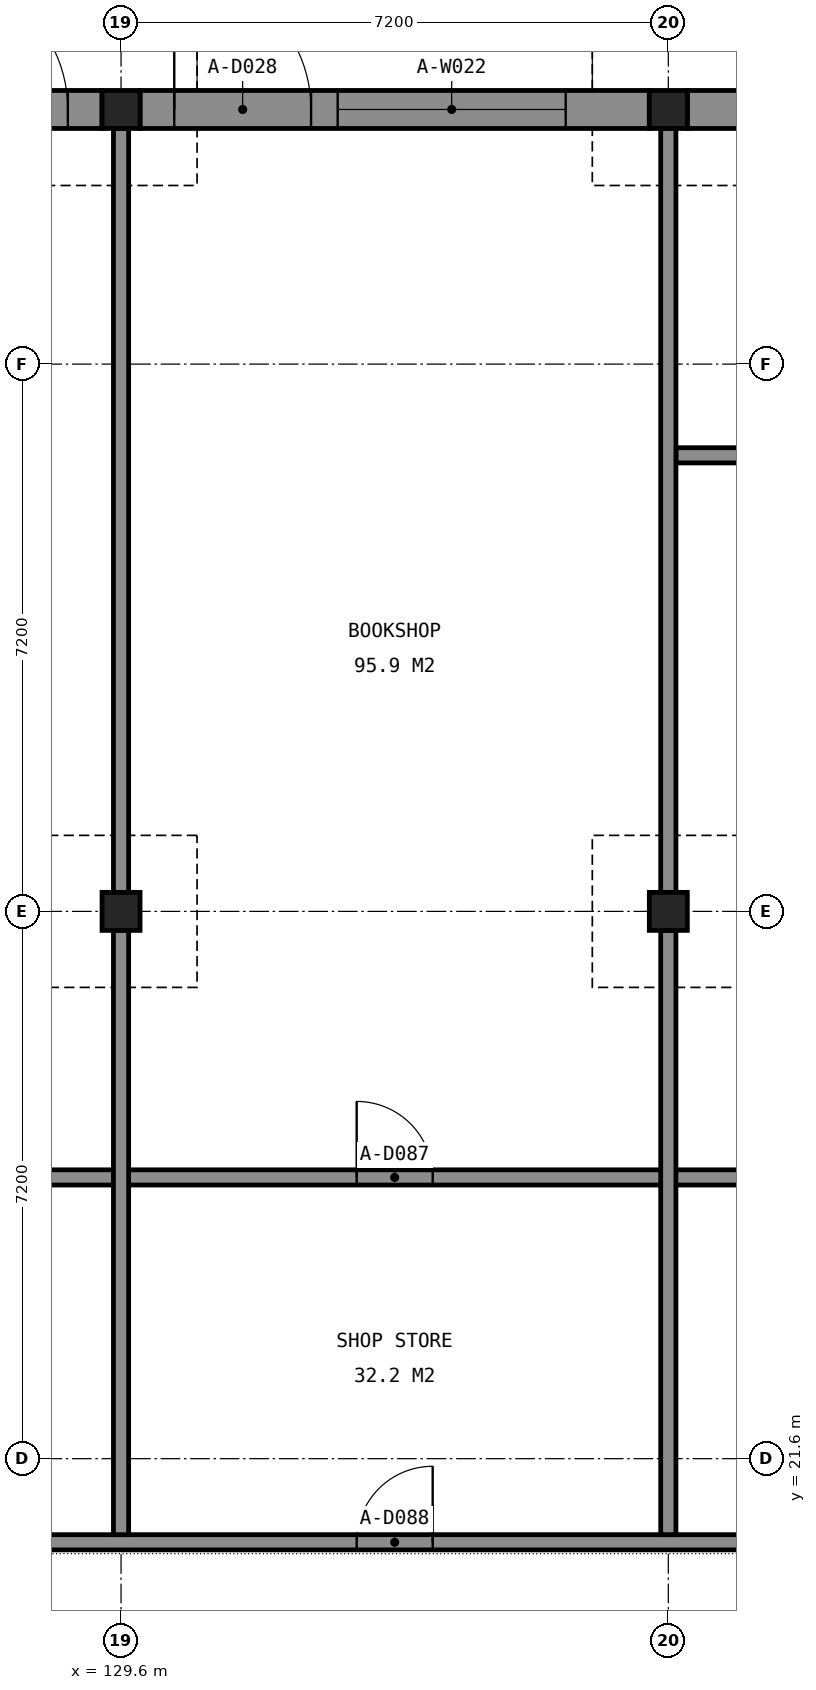
"""IFC4 building model, lengths in metres.
Left out: names, types, materials, properties, quantities, classifications, styles, units other than length and angle.
Written with IfcOpenShell. Run it as: python <this file> out.ifc"""

import sys

from ifc_helpers import new_model, si_unit, direction, frame, frame_2d, origin, origin_2d, place, context, subcontext, project, spatial, rectangle, extrude, element, fill, save


model = new_model("IFC4")
c1 = context("Model", 3, precision=1e-05, world=origin(), true_north=direction((0.0, 1.0)))
c2 = subcontext(c1, "Body", "Model", "MODEL_VIEW")
j1 = project(units=[si_unit("LENGTHUNIT", "METRE"), si_unit("PLANEANGLEUNIT", "RADIAN")], contexts=[c1])
p1 = place(None, origin())
s1 = spatial("IfcSite", under=j1, at=p1, CompositionType="ELEMENT")
p2 = place(p1, origin())
s2 = spatial("IfcBuilding", under=s1, at=p2, CompositionType="ELEMENT")
p3 = place(p2, origin())
s3 = spatial("IfcBuildingStorey", under=s2, at=p3, CompositionType="ELEMENT", Elevation=0.0)
for number, where, z_axis, x_axis in (
    (1, (129.6, 39.35, 0.0), (0.0, 0.0, 1.0), (1.0, 0.0, 0.0)),
    (2, (136.8, 39.35, 0.0), (0.0, 0.0, 1.0), (1.0, 0.0, 0.0)),
    (3, (129.6, 28.8, 0.0), (0.0, 0.0, 1.0), (1.0, 0.0, 0.0)),
    (4, (136.8, 28.8, 0.0), (0.0, 0.0, 1.0), (1.0, 0.0, 0.0)),
):
    element("IfcColumn", number, at=place(p3, frame(where, z_axis=z_axis, x_axis=x_axis)), inside=s3, PredefinedType="COLUMN", context=c2, shape_type="SweptSolid", body=[
        extrude(rectangle(XDim=0.5, YDim=0.5, at=origin_2d()), origin(), (0.0, 0.0, 1.0), 3.7),
    ])
p4 = place(p3, frame((122.65, 39.35, 0.0), z_axis=(0.0, 0.0, 1.0), x_axis=(1.0, 0.0, 0.0)))
e5 = element("IfcWall", 5, at=p4, inside=s3, PredefinedType="SOLIDWALL", context=c2, shape_type="SweptSolid", body=[
    extrude(rectangle(XDim=6.7, YDim=0.5, at=frame_2d((3.35, 0.0))), origin(), (0.0, 0.0, 1.0), 3.6),
])
p5 = place(p4, frame((4.45, 0.0, 0.0)))
e6 = element("IfcOpeningElement", 6, at=p5, cuts=e5, PredefinedType="OPENING", context=c2, shape_type="SweptSolid", body=[
    extrude(rectangle(XDim=1.8, YDim=2.4, at=frame_2d((0.9, 1.2))), frame((0.0, 0.26, 0.0), z_axis=(0.0, -1.0, 0.0), x_axis=(1.0, 0.0, 0.0)), (0.0, 0.0, 1.0), 0.52),
])
p6 = place(p4, frame((0.45, 0.0, 0.6)))
e7 = element("IfcOpeningElement", 7, at=p6, cuts=e5, PredefinedType="OPENING", context=c2, shape_type="SweptSolid", body=[
    extrude(rectangle(XDim=3.0, YDim=2.4, at=frame_2d((1.5, 1.2))), frame((0.0, 0.26, 0.0), z_axis=(0.0, -1.0, 0.0), x_axis=(1.0, 0.0, 0.0)), (0.0, 0.0, 1.0), 0.52),
])
p7 = place(p3, frame((129.85, 39.35, 0.0), z_axis=(0.0, 0.0, 1.0), x_axis=(1.0, 0.0, 0.0)))
e8 = element("IfcWall", 8, at=p7, inside=s3, PredefinedType="SOLIDWALL", context=c2, shape_type="SweptSolid", body=[
    extrude(rectangle(XDim=6.7, YDim=0.5, at=frame_2d((3.35, 0.0))), origin(), (0.0, 0.0, 1.0), 3.6),
])
p8 = place(p7, frame((0.45, 0.0, 0.0)))
e9 = element("IfcOpeningElement", 9, at=p8, cuts=e8, PredefinedType="OPENING", context=c2, shape_type="SweptSolid", body=[
    extrude(rectangle(XDim=1.8, YDim=2.4, at=frame_2d((0.9, 1.2))), frame((0.0, 0.26, 0.0), z_axis=(0.0, -1.0, 0.0), x_axis=(1.0, 0.0, 0.0)), (0.0, 0.0, 1.0), 0.52),
])
p9 = place(p7, frame((2.6, 0.0, 0.6)))
e10 = element("IfcOpeningElement", 10, at=p9, cuts=e8, PredefinedType="OPENING", context=c2, shape_type="SweptSolid", body=[
    extrude(rectangle(XDim=3.0, YDim=2.4, at=frame_2d((1.5, 1.2))), frame((0.0, 0.26, 0.0), z_axis=(0.0, -1.0, 0.0), x_axis=(1.0, 0.0, 0.0)), (0.0, 0.0, 1.0), 0.52),
])
p10 = place(p3, frame((137.05, 39.35, 0.0), z_axis=(0.0, 0.0, 1.0), x_axis=(1.0, 0.0, 0.0)))
e11 = element("IfcWall", 11, at=p10, inside=s3, PredefinedType="SOLIDWALL", context=c2, shape_type="SweptSolid", body=[
    extrude(rectangle(XDim=6.7, YDim=0.5, at=frame_2d((3.35, 0.0))), origin(), (0.0, 0.0, 1.0), 3.6),
])
p11 = place(p10, frame((2.75, 0.0, 0.0)))
e12 = element("IfcOpeningElement", 12, at=p11, cuts=e11, PredefinedType="OPENING", context=c2, shape_type="SweptSolid", body=[
    extrude(rectangle(XDim=1.2, YDim=2.1, at=frame_2d((0.6, 1.05))), frame((0.0, 0.26, 0.0), z_axis=(0.0, -1.0, 0.0), x_axis=(1.0, 0.0, 0.0)), (0.0, 0.0, 1.0), 0.52),
])
p12 = place(p3, frame((54.35, 20.5, 0.0), z_axis=(0.0, 0.0, 1.0), x_axis=(1.0, 0.0, 0.0)))
e13 = element("IfcWall", 13, at=p12, inside=s3, PredefinedType="PARTITIONING", context=c2, shape_type="SweptSolid", body=[
    extrude(rectangle(XDim=92.9, YDim=0.2, at=frame_2d((46.45, 0.0))), origin(), (0.0, 0.0, 1.0), 3.5),
])
p13 = place(p12, frame((1.1, 0.0, 0.0)))
e14 = element("IfcOpeningElement", 14, at=p13, cuts=e13, PredefinedType="OPENING", context=c2, shape_type="SweptSolid", body=[
    extrude(rectangle(XDim=0.9, YDim=2.1, at=frame_2d((0.45, 1.05))), frame((0.0, 0.11, 0.0), z_axis=(0.0, -1.0, 0.0), x_axis=(1.0, 0.0, 0.0)), (0.0, 0.0, 1.0), 0.22),
])
p14 = place(p12, frame((90.9, 0.0, 0.0)))
e15 = element("IfcOpeningElement", 15, at=p14, cuts=e13, PredefinedType="OPENING", context=c2, shape_type="SweptSolid", body=[
    extrude(rectangle(XDim=0.9, YDim=2.1, at=frame_2d((0.45, 1.05))), frame((0.0, 0.11, 0.0), z_axis=(0.0, -1.0, 0.0), x_axis=(1.0, 0.0, 0.0)), (0.0, 0.0, 1.0), 0.22),
])
p15 = place(p12, frame((6.35, 0.0, 0.0)))
e16 = element("IfcOpeningElement", 16, at=p15, cuts=e13, PredefinedType="OPENING", context=c2, shape_type="SweptSolid", body=[
    extrude(rectangle(XDim=1.0, YDim=2.1, at=frame_2d((0.5, 1.05))), frame((0.0, 0.11, 0.0), z_axis=(0.0, -1.0, 0.0), x_axis=(1.0, 0.0, 0.0)), (0.0, 0.0, 1.0), 0.22),
])
p16 = place(p12, frame((13.55, 0.0, 0.0)))
e17 = element("IfcOpeningElement", 17, at=p16, cuts=e13, PredefinedType="OPENING", context=c2, shape_type="SweptSolid", body=[
    extrude(rectangle(XDim=1.0, YDim=2.1, at=frame_2d((0.5, 1.05))), frame((0.0, 0.11, 0.0), z_axis=(0.0, -1.0, 0.0), x_axis=(1.0, 0.0, 0.0)), (0.0, 0.0, 1.0), 0.22),
])
p17 = place(p12, frame((20.75, 0.0, 0.0)))
e18 = element("IfcOpeningElement", 18, at=p17, cuts=e13, PredefinedType="OPENING", context=c2, shape_type="SweptSolid", body=[
    extrude(rectangle(XDim=1.0, YDim=2.1, at=frame_2d((0.5, 1.05))), frame((0.0, 0.11, 0.0), z_axis=(0.0, -1.0, 0.0), x_axis=(1.0, 0.0, 0.0)), (0.0, 0.0, 1.0), 0.22),
])
p18 = place(p12, frame((27.95, 0.0, 0.0)))
e19 = element("IfcOpeningElement", 19, at=p18, cuts=e13, PredefinedType="OPENING", context=c2, shape_type="SweptSolid", body=[
    extrude(rectangle(XDim=1.0, YDim=2.1, at=frame_2d((0.5, 1.05))), frame((0.0, 0.11, 0.0), z_axis=(0.0, -1.0, 0.0), x_axis=(1.0, 0.0, 0.0)), (0.0, 0.0, 1.0), 0.22),
])
p19 = place(p12, frame((35.15, 0.0, 0.0)))
e20 = element("IfcOpeningElement", 20, at=p19, cuts=e13, PredefinedType="OPENING", context=c2, shape_type="SweptSolid", body=[
    extrude(rectangle(XDim=1.0, YDim=2.1, at=frame_2d((0.5, 1.05))), frame((0.0, 0.11, 0.0), z_axis=(0.0, -1.0, 0.0), x_axis=(1.0, 0.0, 0.0)), (0.0, 0.0, 1.0), 0.22),
])
p20 = place(p12, frame((42.35, 0.0, 0.0)))
e21 = element("IfcOpeningElement", 21, at=p20, cuts=e13, PredefinedType="OPENING", context=c2, shape_type="SweptSolid", body=[
    extrude(rectangle(XDim=1.0, YDim=2.1, at=frame_2d((0.5, 1.05))), frame((0.0, 0.11, 0.0), z_axis=(0.0, -1.0, 0.0), x_axis=(1.0, 0.0, 0.0)), (0.0, 0.0, 1.0), 0.22),
])
p21 = place(p12, frame((49.55, 0.0, 0.0)))
e22 = element("IfcOpeningElement", 22, at=p21, cuts=e13, PredefinedType="OPENING", context=c2, shape_type="SweptSolid", body=[
    extrude(rectangle(XDim=1.0, YDim=2.1, at=frame_2d((0.5, 1.05))), frame((0.0, 0.11, 0.0), z_axis=(0.0, -1.0, 0.0), x_axis=(1.0, 0.0, 0.0)), (0.0, 0.0, 1.0), 0.22),
])
p22 = place(p12, frame((56.75, 0.0, 0.0)))
e23 = element("IfcOpeningElement", 23, at=p22, cuts=e13, PredefinedType="OPENING", context=c2, shape_type="SweptSolid", body=[
    extrude(rectangle(XDim=1.0, YDim=2.1, at=frame_2d((0.5, 1.05))), frame((0.0, 0.11, 0.0), z_axis=(0.0, -1.0, 0.0), x_axis=(1.0, 0.0, 0.0)), (0.0, 0.0, 1.0), 0.22),
])
p23 = place(p12, frame((63.95, 0.0, 0.0)))
e24 = element("IfcOpeningElement", 24, at=p23, cuts=e13, PredefinedType="OPENING", context=c2, shape_type="SweptSolid", body=[
    extrude(rectangle(XDim=1.0, YDim=2.1, at=frame_2d((0.5, 1.05))), frame((0.0, 0.11, 0.0), z_axis=(0.0, -1.0, 0.0), x_axis=(1.0, 0.0, 0.0)), (0.0, 0.0, 1.0), 0.22),
])
p24 = place(p12, frame((71.15, 0.0, 0.0)))
e25 = element("IfcOpeningElement", 25, at=p24, cuts=e13, PredefinedType="OPENING", context=c2, shape_type="SweptSolid", body=[
    extrude(rectangle(XDim=1.0, YDim=2.1, at=frame_2d((0.5, 1.05))), frame((0.0, 0.11, 0.0), z_axis=(0.0, -1.0, 0.0), x_axis=(1.0, 0.0, 0.0)), (0.0, 0.0, 1.0), 0.22),
])
p25 = place(p12, frame((78.35, 0.0, 0.0)))
e26 = element("IfcOpeningElement", 26, at=p25, cuts=e13, PredefinedType="OPENING", context=c2, shape_type="SweptSolid", body=[
    extrude(rectangle(XDim=1.0, YDim=2.1, at=frame_2d((0.5, 1.05))), frame((0.0, 0.11, 0.0), z_axis=(0.0, -1.0, 0.0), x_axis=(1.0, 0.0, 0.0)), (0.0, 0.0, 1.0), 0.22),
])
p26 = place(p12, frame((85.55, 0.0, 0.0)))
e27 = element("IfcOpeningElement", 27, at=p26, cuts=e13, PredefinedType="OPENING", context=c2, shape_type="SweptSolid", body=[
    extrude(rectangle(XDim=1.0, YDim=2.1, at=frame_2d((0.5, 1.05))), frame((0.0, 0.11, 0.0), z_axis=(0.0, -1.0, 0.0), x_axis=(1.0, 0.0, 0.0)), (0.0, 0.0, 1.0), 0.22),
])
p27 = place(p3, frame((57.7, 25.3, 0.0), z_axis=(0.0, 0.0, 1.0), x_axis=(1.0, 0.0, 0.0)))
e28 = element("IfcWall", 28, at=p27, inside=s3, PredefinedType="PARTITIONING", context=c2, shape_type="SweptSolid", body=[
    extrude(rectangle(XDim=86.2, YDim=0.2, at=frame_2d((43.1, 0.0))), origin(), (0.0, 0.0, 1.0), 3.5),
])
p28 = place(p27, frame((3.0, 0.0, 0.0)))
e29 = element("IfcOpeningElement", 29, at=p28, cuts=e28, PredefinedType="OPENING", context=c2, shape_type="SweptSolid", body=[
    extrude(rectangle(XDim=1.0, YDim=2.1, at=frame_2d((0.5, 1.05))), frame((0.0, 0.11, 0.0), z_axis=(0.0, -1.0, 0.0), x_axis=(1.0, 0.0, 0.0)), (0.0, 0.0, 1.0), 0.22),
])
p29 = place(p27, frame((10.2, 0.0, 0.0)))
e30 = element("IfcOpeningElement", 30, at=p29, cuts=e28, PredefinedType="OPENING", context=c2, shape_type="SweptSolid", body=[
    extrude(rectangle(XDim=1.0, YDim=2.1, at=frame_2d((0.5, 1.05))), frame((0.0, 0.11, 0.0), z_axis=(0.0, -1.0, 0.0), x_axis=(1.0, 0.0, 0.0)), (0.0, 0.0, 1.0), 0.22),
])
p30 = place(p27, frame((17.4, 0.0, 0.0)))
e31 = element("IfcOpeningElement", 31, at=p30, cuts=e28, PredefinedType="OPENING", context=c2, shape_type="SweptSolid", body=[
    extrude(rectangle(XDim=1.0, YDim=2.1, at=frame_2d((0.5, 1.05))), frame((0.0, 0.11, 0.0), z_axis=(0.0, -1.0, 0.0), x_axis=(1.0, 0.0, 0.0)), (0.0, 0.0, 1.0), 0.22),
])
p31 = place(p27, frame((24.6, 0.0, 0.0)))
e32 = element("IfcOpeningElement", 32, at=p31, cuts=e28, PredefinedType="OPENING", context=c2, shape_type="SweptSolid", body=[
    extrude(rectangle(XDim=1.0, YDim=2.1, at=frame_2d((0.5, 1.05))), frame((0.0, 0.11, 0.0), z_axis=(0.0, -1.0, 0.0), x_axis=(1.0, 0.0, 0.0)), (0.0, 0.0, 1.0), 0.22),
])
p32 = place(p27, frame((31.8, 0.0, 0.0)))
e33 = element("IfcOpeningElement", 33, at=p32, cuts=e28, PredefinedType="OPENING", context=c2, shape_type="SweptSolid", body=[
    extrude(rectangle(XDim=1.0, YDim=2.1, at=frame_2d((0.5, 1.05))), frame((0.0, 0.11, 0.0), z_axis=(0.0, -1.0, 0.0), x_axis=(1.0, 0.0, 0.0)), (0.0, 0.0, 1.0), 0.22),
])
p33 = place(p27, frame((39.0, 0.0, 0.0)))
e34 = element("IfcOpeningElement", 34, at=p33, cuts=e28, PredefinedType="OPENING", context=c2, shape_type="SweptSolid", body=[
    extrude(rectangle(XDim=1.0, YDim=2.1, at=frame_2d((0.5, 1.05))), frame((0.0, 0.11, 0.0), z_axis=(0.0, -1.0, 0.0), x_axis=(1.0, 0.0, 0.0)), (0.0, 0.0, 1.0), 0.22),
])
p34 = place(p27, frame((46.2, 0.0, 0.0)))
e35 = element("IfcOpeningElement", 35, at=p34, cuts=e28, PredefinedType="OPENING", context=c2, shape_type="SweptSolid", body=[
    extrude(rectangle(XDim=1.0, YDim=2.1, at=frame_2d((0.5, 1.05))), frame((0.0, 0.11, 0.0), z_axis=(0.0, -1.0, 0.0), x_axis=(1.0, 0.0, 0.0)), (0.0, 0.0, 1.0), 0.22),
])
p35 = place(p27, frame((53.4, 0.0, 0.0)))
e36 = element("IfcOpeningElement", 36, at=p35, cuts=e28, PredefinedType="OPENING", context=c2, shape_type="SweptSolid", body=[
    extrude(rectangle(XDim=1.0, YDim=2.1, at=frame_2d((0.5, 1.05))), frame((0.0, 0.11, 0.0), z_axis=(0.0, -1.0, 0.0), x_axis=(1.0, 0.0, 0.0)), (0.0, 0.0, 1.0), 0.22),
])
p36 = place(p27, frame((60.6, 0.0, 0.0)))
e37 = element("IfcOpeningElement", 37, at=p36, cuts=e28, PredefinedType="OPENING", context=c2, shape_type="SweptSolid", body=[
    extrude(rectangle(XDim=1.0, YDim=2.1, at=frame_2d((0.5, 1.05))), frame((0.0, 0.11, 0.0), z_axis=(0.0, -1.0, 0.0), x_axis=(1.0, 0.0, 0.0)), (0.0, 0.0, 1.0), 0.22),
])
p37 = place(p27, frame((67.8, 0.0, 0.0)))
e38 = element("IfcOpeningElement", 38, at=p37, cuts=e28, PredefinedType="OPENING", context=c2, shape_type="SweptSolid", body=[
    extrude(rectangle(XDim=1.0, YDim=2.1, at=frame_2d((0.5, 1.05))), frame((0.0, 0.11, 0.0), z_axis=(0.0, -1.0, 0.0), x_axis=(1.0, 0.0, 0.0)), (0.0, 0.0, 1.0), 0.22),
])
p38 = place(p27, frame((75.0, 0.0, 0.0)))
e39 = element("IfcOpeningElement", 39, at=p38, cuts=e28, PredefinedType="OPENING", context=c2, shape_type="SweptSolid", body=[
    extrude(rectangle(XDim=1.0, YDim=2.1, at=frame_2d((0.5, 1.05))), frame((0.0, 0.11, 0.0), z_axis=(0.0, -1.0, 0.0), x_axis=(1.0, 0.0, 0.0)), (0.0, 0.0, 1.0), 0.22),
])
p39 = place(p27, frame((84.65, 0.0, 0.0)))
e40 = element("IfcOpeningElement", 40, at=p39, cuts=e28, PredefinedType="OPENING", context=c2, shape_type="SweptSolid", body=[
    extrude(rectangle(XDim=0.9, YDim=2.1, at=frame_2d((0.45, 1.05))), frame((0.0, 0.11, 0.0), z_axis=(0.0, -1.0, 0.0), x_axis=(1.0, 0.0, 0.0)), (0.0, 0.0, 1.0), 0.22),
])
p40 = place(p3, frame((136.9, 34.8, 0.0), z_axis=(0.0, 0.0, 1.0), x_axis=(1.0, 0.0, 0.0)))
e41 = element("IfcWall", 41, at=p40, inside=s3, PredefinedType="PARTITIONING", context=c2, shape_type="SweptSolid", body=[
    extrude(rectangle(XDim=7.0, YDim=0.2, at=frame_2d((3.5, 0.0))), origin(), (0.0, 0.0, 1.0), 3.5),
])
p41 = place(p40, frame((1.8, 0.0, 0.0)))
e42 = element("IfcOpeningElement", 42, at=p41, cuts=e41, PredefinedType="OPENING", context=c2, shape_type="SweptSolid", body=[
    extrude(rectangle(XDim=1.0, YDim=2.1, at=frame_2d((0.5, 1.05))), frame((0.0, 0.11, 0.0), z_axis=(0.0, -1.0, 0.0), x_axis=(1.0, 0.0, 0.0)), (0.0, 0.0, 1.0), 0.22),
])
p42 = place(p40, frame((5.4, 0.0, 0.0)))
e43 = element("IfcOpeningElement", 43, at=p42, cuts=e41, PredefinedType="OPENING", context=c2, shape_type="SweptSolid", body=[
    extrude(rectangle(XDim=1.0, YDim=2.1, at=frame_2d((0.5, 1.05))), frame((0.0, 0.11, 0.0), z_axis=(0.0, -1.0, 0.0), x_axis=(1.0, 0.0, 0.0)), (0.0, 0.0, 1.0), 0.22),
])
p43 = place(p3, frame((129.6, 20.6, 0.0), z_axis=(0.0, 0.0, 1.0), x_axis=(0.0, 1.0, 0.0)))
e44 = element("IfcWall", 44, at=p43, inside=s3, PredefinedType="PARTITIONING", context=c2, shape_type="SweptSolid", body=[
    extrude(rectangle(XDim=7.95, YDim=0.2, at=frame_2d((3.975, 0.0))), origin(), (0.0, 0.0, 1.0), 3.5),
])
p44 = place(p3, frame((129.6, 29.05, 0.0), z_axis=(0.0, 0.0, 1.0), x_axis=(0.0, 1.0, 0.0)))
e45 = element("IfcWall", 45, at=p44, inside=s3, PredefinedType="PARTITIONING", context=c2, shape_type="SweptSolid", body=[
    extrude(rectangle(XDim=10.05, YDim=0.2, at=frame_2d((5.025, 0.0))), origin(), (0.0, 0.0, 1.0), 3.5),
])
p45 = place(p3, frame((136.8, 20.6, 0.0), z_axis=(0.0, 0.0, 1.0), x_axis=(0.0, 1.0, 0.0)))
e46 = element("IfcWall", 46, at=p45, inside=s3, PredefinedType="PARTITIONING", context=c2, shape_type="SweptSolid", body=[
    extrude(rectangle(XDim=7.95, YDim=0.2, at=frame_2d((3.975, 0.0))), origin(), (0.0, 0.0, 1.0), 3.5),
])
p46 = place(p3, frame((136.8, 29.05, 0.0), z_axis=(0.0, 0.0, 1.0), x_axis=(0.0, 1.0, 0.0)))
e47 = element("IfcWall", 47, at=p46, inside=s3, PredefinedType="PARTITIONING", context=c2, shape_type="SweptSolid", body=[
    extrude(rectangle(XDim=10.05, YDim=0.2, at=frame_2d((5.025, 0.0))), origin(), (0.0, 0.0, 1.0), 3.5),
])
p47 = place(p5, origin())
e48 = element("IfcDoor", 48, at=p47, inside=s3, OperationType="DOUBLE_DOOR_DOUBLE_SWING", PredefinedType="DOOR", context=c2, shape_type="SweptSolid", body=[
    extrude(rectangle(XDim=1.8, YDim=2.4, at=frame_2d((0.9, 1.2))), frame((0.0, 0.025, 0.0), z_axis=(0.0, -1.0, 0.0), x_axis=(1.0, 0.0, 0.0)), (0.0, 0.0, 1.0), 0.05),
])
fill(e6, e48)
p48 = place(p8, origin())
e49 = element("IfcDoor", 49, at=p48, inside=s3, OperationType="DOUBLE_DOOR_DOUBLE_SWING", PredefinedType="DOOR", context=c2, shape_type="SweptSolid", body=[
    extrude(rectangle(XDim=1.8, YDim=2.4, at=frame_2d((0.9, 1.2))), frame((0.0, 0.025, 0.0), z_axis=(0.0, -1.0, 0.0), x_axis=(1.0, 0.0, 0.0)), (0.0, 0.0, 1.0), 0.05),
])
fill(e9, e49)
p49 = place(p9, origin())
e50 = element("IfcWindow", 50, at=p49, inside=s3, PartitioningType="SINGLE_PANEL", PredefinedType="WINDOW", context=c2, shape_type="SweptSolid", body=[
    extrude(rectangle(XDim=3.0, YDim=2.4, at=frame_2d((1.5, 1.2))), frame((0.0, 0.03, 0.0), z_axis=(0.0, -1.0, 0.0), x_axis=(1.0, 0.0, 0.0)), (0.0, 0.0, 1.0), 0.06),
])
fill(e10, e50)
p50 = place(p38, origin())
e51 = element("IfcDoor", 51, at=p50, inside=s3, OperationType="SINGLE_SWING_LEFT", PredefinedType="DOOR", context=c2, shape_type="SweptSolid", body=[
    extrude(rectangle(XDim=1.0, YDim=2.1, at=frame_2d((0.5, 1.05))), frame((0.0, 0.025, 0.0), z_axis=(0.0, -1.0, 0.0), x_axis=(1.0, 0.0, 0.0)), (0.0, 0.0, 1.0), 0.05),
])
fill(e39, e51)
p51 = place(p25, origin())
e52 = element("IfcDoor", 52, at=p51, inside=s3, OperationType="SINGLE_SWING_RIGHT", PredefinedType="DOOR", context=c2, shape_type="SweptSolid", body=[
    extrude(rectangle(XDim=1.0, YDim=2.1, at=frame_2d((0.5, 1.05))), frame((0.0, 0.025, 0.0), z_axis=(0.0, -1.0, 0.0), x_axis=(1.0, 0.0, 0.0)), (0.0, 0.0, 1.0), 0.05),
])
fill(e26, e52)
save(model, sys.argv[1])
